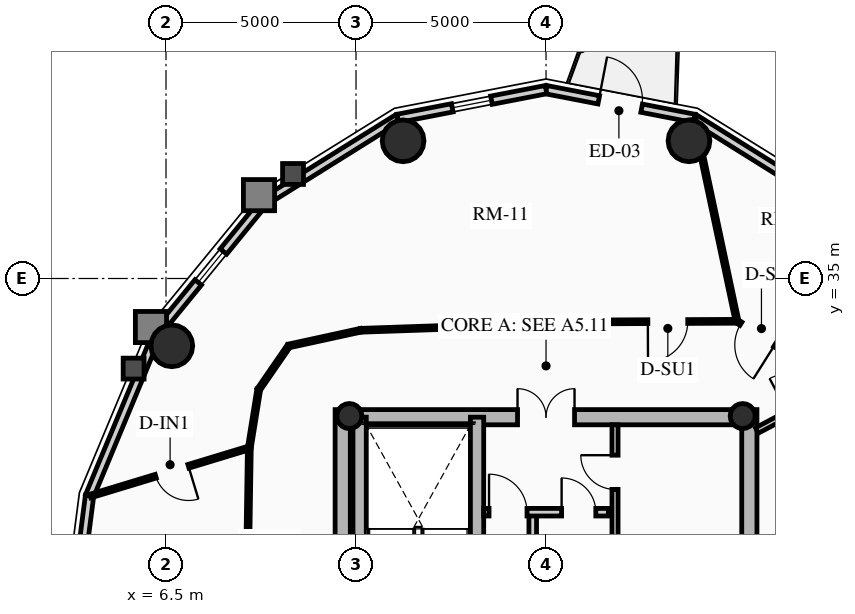
"""IFC4 building model, lengths in metres.
Left out: names, types, materials, properties, quantities, classifications, styles, units other than length and angle.
Written with IfcOpenShell. Run it as: python <this file> out.ifc"""

import sys

from ifc_helpers import new_model, si_unit, direction, frame, frame_2d, origin, origin_2d, place, context, subcontext, project, spatial, rectangle, circle, hollow_circle, extrude, source, transform, mapped, element, fill, save


model = new_model("IFC4")
c1 = context("Model", 3, precision=1e-05, world=origin(), true_north=direction((0.0, 1.0)))
c2 = subcontext(c1, "Body", "Model", "MODEL_VIEW")
j1 = project(units=[si_unit("LENGTHUNIT", "METRE"), si_unit("PLANEANGLEUNIT", "RADIAN")], contexts=[c1])
p1 = place(None, origin())
s1 = spatial("IfcSite", under=j1, at=p1, CompositionType="ELEMENT")
p2 = place(p1, origin())
s2 = spatial("IfcBuilding", under=s1, at=p2, CompositionType="ELEMENT")
p3 = place(p2, frame((0.0, 0.0, 232.45)))
s3 = spatial("IfcBuildingStorey", under=s2, at=p3, CompositionType="ELEMENT", Elevation=232.45)
for number, where, z_axis, x_axis in (
    (1, (11.15, 17.45, 0.0), (0.0, 0.0, 1.0), (0.0, 1.0, 0.0)),
    (2, (21.85, 17.45, 0.0), (0.0, 0.0, 1.0), (0.0, 1.0, 0.0)),
):
    element("IfcWall", number, at=place(p3, frame(where, z_axis=z_axis, x_axis=x_axis)), inside=s3, PredefinedType="SHEAR", context=c2, shape_type="SweptSolid", body=[
        extrude(rectangle(XDim=14.1, YDim=0.4, at=frame_2d((7.05, 0.0))), origin(), (0.0, 0.0, 1.0), 3.2),
    ])
p4 = place(p3, frame((11.15, 31.35, 0.0), z_axis=(0.0, 0.0, 1.0), x_axis=(1.0, 0.0, 0.0)))
e3 = element("IfcWall", 3, at=p4, inside=s3, PredefinedType="SHEAR", context=c2, shape_type="SweptSolid", body=[
    extrude(rectangle(XDim=10.7, YDim=0.4, at=frame_2d((5.35, 0.0))), origin(), (0.0, 0.0, 1.0), 3.2),
])
m1 = source(origin(), c2, "Body", "SweptSolid", [
    extrude(rectangle(XDim=1.5, YDim=2.02, at=frame_2d((0.75, 1.01))), frame((0.0, 0.21, 0.0), z_axis=(0.0, -1.0, 0.0), x_axis=(1.0, 0.0, 0.0)), (0.0, 0.0, 1.0), 0.42),
])
p5 = place(p4, frame((4.6, 0.0, 0.0)))
e4 = element("IfcOpeningElement", 4, at=p5, cuts=e3, PredefinedType="OPENING", context=c2, shape_type="MappedRepresentation", body=[
    mapped(m1, transform((0.0, 0.0, 0.0), x_axis=(1.0, 0.0, 0.0), y_axis=(0.0, 1.0, 0.0), z_axis=(0.0, 0.0, 1.0), scale=1.0)),
])
p6 = place(p3, frame((14.685, 17.65, 0.0), z_axis=(0.0, 0.0, 1.0), x_axis=(0.0, 1.0, 0.0)))
e5 = element("IfcWall", 5, at=p6, inside=s3, PredefinedType="SHEAR", context=c2, shape_type="SweptSolid", body=[
    extrude(rectangle(XDim=13.7, YDim=0.35, at=frame_2d((6.85, 0.0))), origin(), (0.0, 0.0, 1.0), 3.2),
])
m2 = source(origin(), c2, "Body", "SweptSolid", [
    extrude(rectangle(XDim=1.1, YDim=2.015, at=frame_2d((0.55, 1.007))), frame((0.0, 0.185, 0.0), z_axis=(0.0, -1.0, 0.0), x_axis=(1.0, 0.0, 0.0)), (0.0, 0.0, 1.0), 0.37),
])
p7 = place(p6, frame((4.85, 0.0, 0.0)))
e6 = element("IfcOpeningElement", 6, at=p7, cuts=e5, PredefinedType="OPENING", context=c2, shape_type="MappedRepresentation", body=[
    mapped(m2, transform((0.0, 0.0, 0.0), x_axis=(1.0, 0.0, 0.0), y_axis=(0.0, 1.0, 0.0), z_axis=(0.0, 0.0, 1.0), scale=1.0)),
])
p8 = place(p6, frame((0.625, 0.0, 0.0)))
e7 = element("IfcOpeningElement", 7, at=p8, cuts=e5, PredefinedType="OPENING", context=c2, shape_type="MappedRepresentation", body=[
    mapped(m2, transform((0.0, 0.0, 0.0), x_axis=(1.0, 0.0, 0.0), y_axis=(0.0, 1.0, 0.0), z_axis=(0.0, 0.0, 1.0), scale=1.0)),
])
p9 = place(p6, frame((2.625, 0.0, 0.0)))
e8 = element("IfcOpeningElement", 8, at=p9, cuts=e5, PredefinedType="OPENING", context=c2, shape_type="MappedRepresentation", body=[
    mapped(m2, transform((0.0, 0.0, 0.0), x_axis=(1.0, 0.0, 0.0), y_axis=(0.0, 1.0, 0.0), z_axis=(0.0, 0.0, 1.0), scale=1.0)),
])
m3 = source(origin(), c2, "Body", "SweptSolid", [
    extrude(rectangle(XDim=1.15, YDim=2.02, at=frame_2d((0.575, 1.01))), frame((0.0, 0.185, 0.0), z_axis=(0.0, -1.0, 0.0), x_axis=(1.0, 0.0, 0.0)), (0.0, 0.0, 1.0), 0.37),
])
p10 = place(p6, frame((7.27, 0.0, 0.0)))
e9 = element("IfcOpeningElement", 9, at=p10, cuts=e5, PredefinedType="OPENING", context=c2, shape_type="MappedRepresentation", body=[
    mapped(m3, transform((0.0, 0.0, 0.0), x_axis=(1.0, 0.0, 0.0), y_axis=(0.0, 1.0, 0.0), z_axis=(0.0, 0.0, 1.0), scale=1.0)),
])
p11 = place(p3, frame((11.595, 24.655, 0.0), z_axis=(0.0, 0.0, 1.0), x_axis=(0.0, 1.0, 0.0)))
e10 = element("IfcWall", 10, at=p11, inside=s3, PredefinedType="SHEAR", context=c2, shape_type="SweptSolid", body=[
    extrude(rectangle(XDim=6.695, YDim=0.35, at=frame_2d((3.348, 0.0))), origin(), (0.0, 0.0, 1.0), 3.2),
])
for number, where, z_axis, x_axis in (
    (11, (11.325, 31.38, 0.0), (0.0, 0.0, 1.0), (1.0, 0.0, 0.0)),
    (12, (21.675, 31.38, 0.0), (0.0, 0.0, 1.0), (1.0, 0.0, 0.0)),
):
    element("IfcColumn", number, at=place(p3, frame(where, z_axis=z_axis, x_axis=x_axis)), inside=s3, PredefinedType="COLUMN", context=c2, shape_type="SweptSolid", body=[
        extrude(hollow_circle(Radius=0.33, WallThickness=0.025, at=origin_2d()), origin(), (0.0, 0.0, 1.0), 3.2),
    ])
for number, where, z_axis, x_axis in (
    (13, (20.261, 38.623, 0.0), (0.0, 0.0, 1.0), (1.0, 0.0, 0.0)),
    (14, (12.739, 38.623, 0.0), (0.0, 0.0, 1.0), (1.0, 0.0, 0.0)),
    (15, (6.653, 33.229, 0.0), (0.0, 0.0, 1.0), (1.0, 0.0, 0.0)),
):
    element("IfcColumn", number, at=place(p3, frame(where, z_axis=z_axis, x_axis=x_axis)), inside=s3, PredefinedType="USERDEFINED", context=c2, shape_type="SweptSolid", body=[
        extrude(circle(Radius=0.55, at=origin_2d()), origin(), (0.0, 0.0, 1.0), 3.2),
    ])
p12 = place(p3, frame((20.403, 39.213, 0.0), z_axis=(0.0, 0.0, 1.0), x_axis=(0.848318713376, -0.529485939886, 0.0)))
e16 = element("IfcWall", 16, at=p12, inside=s3, PredefinedType="SOLIDWALL", context=c2, shape_type="SweptSolid", body=[
    extrude(rectangle(XDim=4.15, YDim=0.22, at=frame_2d((2.075, 0.0))), origin(), (0.0, 0.0, 1.0), 2.402),
])
p13 = place(p3, frame((16.5, 39.97, 0.0), z_axis=(0.0, 0.0, 1.0), x_axis=(0.981700307484, -0.190432419211, 0.0)))
e17 = element("IfcWall", 17, at=p13, inside=s3, PredefinedType="SOLIDWALL", context=c2, shape_type="SweptSolid", body=[
    extrude(rectangle(XDim=3.976, YDim=0.22, at=frame_2d((1.988, 0.0))), origin(), (0.0, 0.0, 1.0), 2.402),
])
m4 = source(origin(), c2, "Body", "SweptSolid", [
    extrude(rectangle(XDim=1.15, YDim=2.005, at=frame_2d((0.575, 1.002))), frame((0.0, 0.12, 0.0), z_axis=(0.0, -1.0, 0.0), x_axis=(1.0, 0.0, 0.0)), (0.0, 0.0, 1.0), 0.24),
])
p14 = place(p13, frame((1.413, 0.0, 0.0)))
e18 = element("IfcOpeningElement", 18, at=p14, cuts=e17, PredefinedType="OPENING", context=c2, shape_type="MappedRepresentation", body=[
    mapped(m4, transform((0.0, 0.0, 0.0), x_axis=(1.0, 0.0, 0.0), y_axis=(0.0, 1.0, 0.0), z_axis=(0.0, 0.0, 1.0), scale=1.0)),
])
p15 = place(p3, frame((12.597, 39.213, 0.0), z_axis=(0.0, 0.0, 1.0), x_axis=(0.981700307484, 0.190432419211, 0.0)))
e19 = element("IfcWall", 19, at=p15, inside=s3, PredefinedType="SOLIDWALL", context=c2, shape_type="SweptSolid", body=[
    extrude(rectangle(XDim=3.976, YDim=0.22, at=frame_2d((1.988, 0.0))), origin(), (0.0, 0.0, 1.0), 2.402),
])
m5 = source(origin(), c2, "Body", "SweptSolid", [
    extrude(rectangle(XDim=1.05, YDim=1.3, at=frame_2d((0.525, 0.65))), frame((0.0, 0.12, 0.0), z_axis=(0.0, -1.0, 0.0), x_axis=(1.0, 0.0, 0.0)), (0.0, 0.0, 1.0), 0.24),
])
p16 = place(p15, frame((1.463, 0.0, 0.65)))
e20 = element("IfcOpeningElement", 20, at=p16, cuts=e19, PredefinedType="OPENING", context=c2, shape_type="MappedRepresentation", body=[
    mapped(m5, transform((0.0, 0.0, 0.0), x_axis=(1.0, 0.0, 0.0), y_axis=(0.0, 1.0, 0.0), z_axis=(0.0, 0.0, 1.0), scale=1.0)),
])
p17 = place(p3, frame((9.076, 37.015, 0.0), z_axis=(0.0, 0.0, 1.0), x_axis=(0.848318713376, 0.529485939886, 0.0)))
e21 = element("IfcWall", 21, at=p17, inside=s3, PredefinedType="SOLIDWALL", context=c2, shape_type="SweptSolid", body=[
    extrude(rectangle(XDim=4.15, YDim=0.22, at=frame_2d((2.075, 0.0))), origin(), (0.0, 0.0, 1.0), 2.402),
])
p18 = place(p3, frame((6.282, 33.593, 0.0), z_axis=(0.0, 0.0, 1.0), x_axis=(0.632467166636, 0.774587169483, 0.0)))
e22 = element("IfcWall", 22, at=p18, inside=s3, PredefinedType="SOLIDWALL", context=c2, shape_type="SweptSolid", body=[
    extrude(rectangle(XDim=4.418, YDim=0.22, at=frame_2d((2.209, 0.0))), origin(), (0.0, 0.0, 1.0), 2.402),
])
p19 = place(p18, frame((1.684, 0.0, 0.65)))
e23 = element("IfcOpeningElement", 23, at=p19, cuts=e22, PredefinedType="OPENING", context=c2, shape_type="MappedRepresentation", body=[
    mapped(m5, transform((0.0, 0.0, 0.0), x_axis=(1.0, 0.0, 0.0), y_axis=(0.0, 1.0, 0.0), z_axis=(0.0, 0.0, 1.0), scale=1.0)),
])
p20 = place(p3, frame((4.488, 29.281, 0.0), z_axis=(0.0, 0.0, 1.0), x_axis=(0.384036305194, 0.923317993052, 0.0)))
e24 = element("IfcWall", 24, at=p20, inside=s3, PredefinedType="SOLIDWALL", context=c2, shape_type="SweptSolid", body=[
    extrude(rectangle(XDim=4.671, YDim=0.22, at=frame_2d((2.335, 0.0))), origin(), (0.0, 0.0, 1.0), 2.402),
])
p21 = place(p3, frame((3.87, 24.5, 0.0), z_axis=(0.0, 0.0, 1.0), x_axis=(0.128241318541, 0.991742993027, 0.0)))
e25 = element("IfcWall", 25, at=p21, inside=s3, PredefinedType="SOLIDWALL", context=c2, shape_type="SweptSolid", body=[
    extrude(rectangle(XDim=4.82, YDim=0.22, at=frame_2d((2.41, 0.0))), origin(), (0.0, 0.0, 1.0), 2.402),
])
p22 = place(p21, frame((1.885, 0.0, 0.65)))
e26 = element("IfcOpeningElement", 26, at=p22, cuts=e25, PredefinedType="OPENING", context=c2, shape_type="MappedRepresentation", body=[
    mapped(m5, transform((0.0, 0.0, 0.0), x_axis=(1.0, 0.0, 0.0), y_axis=(0.0, 1.0, 0.0), z_axis=(0.0, 0.0, 1.0), scale=1.0)),
])
p23 = place(p3, frame((16.15, 26.45, 0.0), z_axis=(0.0, 0.0, 1.0), x_axis=(0.0, 1.0, 0.0)))
e27 = element("IfcWall", 27, at=p23, inside=s3, PredefinedType="PARTITIONING", context=c2, shape_type="SweptSolid", body=[
    extrude(rectangle(XDim=2.4, YDim=0.2, at=frame_2d((1.2, 0.0))), origin(), (0.0, 0.0, 1.0), 2.765),
])
p24 = place(p3, frame((14.86, 28.85, 0.0), z_axis=(0.0, 0.0, 1.0), x_axis=(1.0, 0.0, 0.0)))
e28 = element("IfcWall", 28, at=p24, inside=s3, PredefinedType="PARTITIONING", context=c2, shape_type="SweptSolid", body=[
    extrude(rectangle(XDim=3.28, YDim=0.2, at=frame_2d((1.64, 0.0))), origin(), (0.0, 0.0, 1.0), 2.765),
])
m6 = source(origin(), c2, "Body", "SweptSolid", [
    extrude(rectangle(XDim=1.0, YDim=2.015, at=frame_2d((0.5, 1.007))), frame((0.0, 0.11, 0.0), z_axis=(0.0, -1.0, 0.0), x_axis=(1.0, 0.0, 0.0)), (0.0, 0.0, 1.0), 0.22),
])
p25 = place(p24, frame((0.14, 0.0, 0.0)))
e29 = element("IfcOpeningElement", 29, at=p25, cuts=e28, PredefinedType="OPENING", context=c2, shape_type="MappedRepresentation", body=[
    mapped(m6, transform((0.0, 0.0, 0.0), x_axis=(1.0, 0.0, 0.0), y_axis=(0.0, 1.0, 0.0), z_axis=(0.0, 0.0, 1.0), scale=1.0)),
])
m7 = source(origin(), c2, "Body", "SweptSolid", [
    extrude(rectangle(XDim=0.9, YDim=2.005, at=frame_2d((0.45, 1.002))), frame((0.0, 0.11, 0.0), z_axis=(0.0, -1.0, 0.0), x_axis=(1.0, 0.0, 0.0)), (0.0, 0.0, 1.0), 0.22),
])
p26 = place(p24, frame((2.05, 0.0, 0.0)))
e30 = element("IfcOpeningElement", 30, at=p26, cuts=e28, PredefinedType="OPENING", context=c2, shape_type="MappedRepresentation", body=[
    mapped(m7, transform((0.0, 0.0, 0.0), x_axis=(1.0, 0.0, 0.0), y_axis=(0.0, 1.0, 0.0), z_axis=(0.0, 0.0, 1.0), scale=1.0)),
])
p27 = place(p3, frame((18.315, 27.25, 0.0), z_axis=(0.0, 0.0, 1.0), x_axis=(0.0, 1.0, 0.0)))
e31 = element("IfcWall", 31, at=p27, inside=s3, PredefinedType="PARTITIONING", context=c2, shape_type="SweptSolid", body=[
    extrude(rectangle(XDim=3.9, YDim=0.16, at=frame_2d((1.95, 0.0))), origin(), (0.0, 0.0, 1.0), 2.765),
])
m8 = source(origin(), c2, "Body", "SweptSolid", [
    extrude(rectangle(XDim=0.9, YDim=2.005, at=frame_2d((0.45, 1.002))), frame((0.0, 0.09, 0.0), z_axis=(0.0, -1.0, 0.0), x_axis=(1.0, 0.0, 0.0)), (0.0, 0.0, 1.0), 0.18),
])
p28 = place(p27, frame((2.2, 0.0, 0.0)))
e32 = element("IfcOpeningElement", 32, at=p28, cuts=e31, PredefinedType="OPENING", context=c2, shape_type="MappedRepresentation", body=[
    mapped(m8, transform((0.0, 0.0, 0.0), x_axis=(1.0, 0.0, 0.0), y_axis=(0.0, 1.0, 0.0), z_axis=(0.0, 0.0, 1.0), scale=1.0)),
])
p29 = place(p3, frame((22.877, 33.022, 0.0), z_axis=(0.0, 0.0, 1.0), x_axis=(-0.845895608855, 0.533348496689, 0.0)))
e33 = element("IfcWall", 33, at=p29, inside=s3, PredefinedType="MOVABLE", context=c2, shape_type="SweptSolid", body=[
    extrude(rectangle(XDim=1.597, YDim=0.1, at=frame_2d((0.798, 0.0))), origin(), (0.0, 0.0, 1.0), 2.335),
])
m9 = source(origin(), c2, "Body", "SweptSolid", [
    extrude(rectangle(XDim=1.05, YDim=2.015, at=frame_2d((0.525, 1.007))), frame((0.0, 0.06, 0.0), z_axis=(0.0, -1.0, 0.0), x_axis=(1.0, 0.0, 0.0)), (0.0, 0.0, 1.0), 0.12),
])
p30 = place(p29, frame((0.427, 0.0, 0.0)))
e34 = element("IfcOpeningElement", 34, at=p30, cuts=e33, PredefinedType="OPENING", context=c2, shape_type="MappedRepresentation", body=[
    mapped(m9, transform((0.0, 0.0, 0.0), x_axis=(1.0, 0.0, 0.0), y_axis=(0.0, 1.0, 0.0), z_axis=(0.0, 0.0, 1.0), scale=1.0)),
])
p31 = place(p3, frame((21.527, 33.873, 0.0), z_axis=(0.0, 0.0, 1.0), x_axis=(-0.999991838845, -0.004040079574, 0.0)))
e35 = element("IfcWall", 35, at=p31, inside=s3, PredefinedType="MOVABLE", context=c2, shape_type="SweptSolid", body=[
    extrude(rectangle(XDim=3.384, YDim=0.1, at=frame_2d((1.692, 0.0))), origin(), (0.0, 0.0, 1.0), 2.402),
])
p32 = place(p31, frame((1.298, 0.0, 0.0)))
e36 = element("IfcOpeningElement", 36, at=p32, cuts=e35, PredefinedType="OPENING", context=c2, shape_type="MappedRepresentation", body=[
    mapped(m9, transform((0.0, 0.0, 0.0), x_axis=(1.0, 0.0, 0.0), y_axis=(0.0, 1.0, 0.0), z_axis=(0.0, 0.0, 1.0), scale=1.0)),
])
p33 = place(p3, frame((18.143, 33.86, 0.0), z_axis=(0.0, 0.0, 1.0), x_axis=(-0.999419208319, -0.034077060363, 0.0)))
e37 = element("IfcWall", 37, at=p33, inside=s3, PredefinedType="MOVABLE", context=c2, shape_type="SweptSolid", body=[
    extrude(rectangle(XDim=6.527, YDim=0.1, at=frame_2d((3.263, 0.0))), origin(), (0.0, 0.0, 1.0), 2.335),
])
p34 = place(p3, frame((11.62, 33.637, 0.0), z_axis=(0.0, 0.0, 1.0), x_axis=(-0.97702579435, -0.213121085711, 0.0)))
e38 = element("IfcWall", 38, at=p34, inside=s3, PredefinedType="MOVABLE", context=c2, shape_type="SweptSolid", body=[
    extrude(rectangle(XDim=1.935, YDim=0.1, at=frame_2d((0.967, 0.0))), origin(), (0.0, 0.0, 1.0), 2.335),
])
p35 = place(p3, frame((9.729, 33.225, 0.0), z_axis=(0.0, 0.0, 1.0), x_axis=(-0.567183649484, -0.82359134755, 0.0)))
e39 = element("IfcWall", 39, at=p35, inside=s3, PredefinedType="MOVABLE", context=c2, shape_type="SweptSolid", body=[
    extrude(rectangle(XDim=1.392, YDim=0.1, at=frame_2d((0.696, 0.0))), origin(), (0.0, 0.0, 1.0), 2.402),
])
p36 = place(p3, frame((8.94, 32.078, 0.0), z_axis=(0.0, 0.0, 1.0), x_axis=(-0.159148467753, -0.98725466077, 0.0)))
e40 = element("IfcWall", 40, at=p36, inside=s3, PredefinedType="MOVABLE", context=c2, shape_type="SweptSolid", body=[
    extrude(rectangle(XDim=1.554, YDim=0.1, at=frame_2d((0.777, 0.0))), origin(), (0.0, 0.0, 1.0), 2.335),
])
p37 = place(p3, frame((8.693, 30.544, 0.0), z_axis=(0.0, 0.0, 1.0), x_axis=(-0.015307007986, -0.99988284089, 0.0)))
e41 = element("IfcWall", 41, at=p37, inside=s3, PredefinedType="MOVABLE", context=c2, shape_type="SweptSolid", body=[
    extrude(rectangle(XDim=6.045, YDim=0.1, at=frame_2d((3.022, 0.0))), origin(), (0.0, 0.0, 1.0), 2.335),
])
p38 = place(p3, frame((21.527, 33.873, 0.0), z_axis=(0.0, 0.0, 1.0), x_axis=(-0.207772326864, 0.97817721308, 0.0)))
e42 = element("IfcWall", 42, at=p38, inside=s3, PredefinedType="MOVABLE", context=c2, shape_type="SweptSolid", body=[
    extrude(rectangle(XDim=5.439, YDim=0.1, at=frame_2d((2.72, 0.0))), origin(), (0.0, 0.0, 1.0), 2.402),
])
p39 = place(p3, frame((22.05, 31.0, 0.0), z_axis=(0.0, 0.0, 1.0), x_axis=(0.882791584709, 0.469764853908, 0.0)))
e43 = element("IfcWall", 43, at=p39, inside=s3, PredefinedType="PARTITIONING", context=c2, shape_type="SweptSolid", body=[
    extrude(rectangle(XDim=2.186, YDim=0.16, at=frame_2d((1.093, 0.0))), origin(), (0.0, 0.0, 1.0), 2.335),
])
m10 = source(origin(), c2, "Body", "SweptSolid", [
    extrude(rectangle(XDim=1.05, YDim=2.015, at=frame_2d((0.525, 1.007))), frame((0.0, 0.09, 0.0), z_axis=(0.0, -1.0, 0.0), x_axis=(1.0, 0.0, 0.0)), (0.0, 0.0, 1.0), 0.18),
])
p40 = place(p39, frame((0.936, 0.0, 0.0)))
e44 = element("IfcOpeningElement", 44, at=p40, cuts=e43, PredefinedType="OPENING", context=c2, shape_type="MappedRepresentation", body=[
    mapped(m10, transform((0.0, 0.0, 0.0), x_axis=(1.0, 0.0, 0.0), y_axis=(0.0, 1.0, 0.0), z_axis=(0.0, 0.0, 1.0), scale=1.0)),
])
p41 = place(p3, frame((8.693, 30.544, 0.0), z_axis=(0.0, 0.0, 1.0), x_axis=(-0.956933754187, -0.290306372814, 0.0)))
e45 = element("IfcWall", 45, at=p41, inside=s3, PredefinedType="MOVABLE", context=c2, shape_type="SweptSolid", body=[
    extrude(rectangle(XDim=4.374, YDim=0.1, at=frame_2d((2.187, 0.0))), origin(), (0.0, 0.0, 1.0), 2.335),
])
m11 = source(origin(), c2, "Body", "SweptSolid", [
    extrude(rectangle(XDim=0.9, YDim=2.005, at=frame_2d((0.45, 1.002))), frame((0.0, 0.06, 0.0), z_axis=(0.0, -1.0, 0.0), x_axis=(1.0, 0.0, 0.0)), (0.0, 0.0, 1.0), 0.12),
])
p42 = place(p41, frame((1.674, 0.0, 0.0)))
e46 = element("IfcOpeningElement", 46, at=p42, cuts=e45, PredefinedType="OPENING", context=c2, shape_type="MappedRepresentation", body=[
    mapped(m11, transform((0.0, 0.0, 0.0), x_axis=(1.0, 0.0, 0.0), y_axis=(0.0, 1.0, 0.0), z_axis=(0.0, 0.0, 1.0), scale=1.0)),
])
m12 = source(origin(), c2, "Body", "SweptSolid", [
    extrude(rectangle(XDim=1.15, YDim=2.005, at=frame_2d((0.575, 1.002))), frame((0.0, 0.025, 0.0), z_axis=(0.0, -1.0, 0.0), x_axis=(1.0, 0.0, 0.0)), (0.0, 0.0, 1.0), 0.05),
])
p43 = place(p14, origin())
e47 = element("IfcDoor", 47, at=p43, inside=s3, OperationType="SINGLE_SWING_LEFT", PredefinedType="DOOR", context=c2, shape_type="MappedRepresentation", body=[
    mapped(m12, transform((0.0, 0.0, 0.0), x_axis=(1.0, 0.0, 0.0), y_axis=(0.0, 1.0, 0.0), z_axis=(0.0, 0.0, 1.0), scale=1.0)),
])
fill(e18, e47)
m13 = source(origin(), c2, "Body", "SweptSolid", [
    extrude(rectangle(XDim=1.05, YDim=1.3, at=frame_2d((0.525, 0.65))), frame((0.0, 0.03, 0.0), z_axis=(0.0, -1.0, 0.0), x_axis=(1.0, 0.0, 0.0)), (0.0, 0.0, 1.0), 0.06),
])
p44 = place(p16, origin())
e48 = element("IfcWindow", 48, at=p44, inside=s3, PartitioningType="SINGLE_PANEL", PredefinedType="WINDOW", context=c2, shape_type="MappedRepresentation", body=[
    mapped(m13, transform((0.0, 0.0, 0.0), x_axis=(1.0, 0.0, 0.0), y_axis=(0.0, 1.0, 0.0), z_axis=(0.0, 0.0, 1.0), scale=1.0)),
])
fill(e20, e48)
p45 = place(p19, origin())
e49 = element("IfcWindow", 49, at=p45, inside=s3, PartitioningType="SINGLE_PANEL", PredefinedType="WINDOW", context=c2, shape_type="MappedRepresentation", body=[
    mapped(m13, transform((0.0, 0.0, 0.0), x_axis=(1.0, 0.0, 0.0), y_axis=(0.0, 1.0, 0.0), z_axis=(0.0, 0.0, 1.0), scale=1.0)),
])
fill(e23, e49)
m14 = source(origin(), c2, "Body", "SweptSolid", [
    extrude(rectangle(XDim=1.5, YDim=2.02, at=frame_2d((0.75, 1.01))), frame((0.0, 0.025, 0.0), z_axis=(0.0, -1.0, 0.0), x_axis=(1.0, 0.0, 0.0)), (0.0, 0.0, 1.0), 0.05),
])
p46 = place(p5, origin())
e50 = element("IfcDoor", 50, at=p46, inside=s3, OperationType="DOUBLE_DOOR_SINGLE_SWING", PredefinedType="DOOR", context=c2, shape_type="MappedRepresentation", body=[
    mapped(m14, transform((0.0, 0.0, 0.0), x_axis=(1.0, 0.0, 0.0), y_axis=(0.0, 1.0, 0.0), z_axis=(0.0, 0.0, 1.0), scale=1.0)),
])
fill(e4, e50)
m15 = source(origin(), c2, "Body", "SweptSolid", [
    extrude(rectangle(XDim=1.0, YDim=2.015, at=frame_2d((0.5, 1.007))), frame((0.0, 0.025, 0.0), z_axis=(0.0, -1.0, 0.0), x_axis=(1.0, 0.0, 0.0)), (0.0, 0.0, 1.0), 0.05),
])
p47 = place(p25, origin())
e51 = element("IfcDoor", 51, at=p47, inside=s3, OperationType="SINGLE_SWING_LEFT", PredefinedType="DOOR", context=c2, shape_type="MappedRepresentation", body=[
    mapped(m15, transform((0.0, 0.0, 0.0), x_axis=(1.0, 0.0, 0.0), y_axis=(0.0, 1.0, 0.0), z_axis=(0.0, 0.0, 1.0), scale=1.0)),
])
fill(e29, e51)
m16 = source(origin(), c2, "Body", "SweptSolid", [
    extrude(rectangle(XDim=0.9, YDim=2.005, at=frame_2d((0.45, 1.002))), frame((0.0, 0.025, 0.0), z_axis=(0.0, -1.0, 0.0), x_axis=(1.0, 0.0, 0.0)), (0.0, 0.0, 1.0), 0.05),
])
p48 = place(p26, origin())
e52 = element("IfcDoor", 52, at=p48, inside=s3, OperationType="SINGLE_SWING_LEFT", PredefinedType="DOOR", context=c2, shape_type="MappedRepresentation", body=[
    mapped(m16, transform((0.0, 0.0, 0.0), x_axis=(1.0, 0.0, 0.0), y_axis=(0.0, 1.0, 0.0), z_axis=(0.0, 0.0, 1.0), scale=1.0)),
])
fill(e30, e52)
p49 = place(p28, origin())
e53 = element("IfcDoor", 53, at=p49, inside=s3, OperationType="SINGLE_SWING_RIGHT", PredefinedType="DOOR", context=c2, shape_type="MappedRepresentation", body=[
    mapped(m16, transform((0.0, 0.0, 0.0), x_axis=(1.0, 0.0, 0.0), y_axis=(0.0, 1.0, 0.0), z_axis=(0.0, 0.0, 1.0), scale=1.0)),
])
fill(e32, e53)
m17 = source(origin(), c2, "Body", "SweptSolid", [
    extrude(rectangle(XDim=1.05, YDim=2.015, at=frame_2d((0.525, 1.007))), frame((0.0, 0.025, 0.0), z_axis=(0.0, -1.0, 0.0), x_axis=(1.0, 0.0, 0.0)), (0.0, 0.0, 1.0), 0.05),
])
p50 = place(p30, origin())
e54 = element("IfcDoor", 54, at=p50, inside=s3, OperationType="SINGLE_SWING_LEFT", PredefinedType="DOOR", context=c2, shape_type="MappedRepresentation", body=[
    mapped(m17, transform((0.0, 0.0, 0.0), x_axis=(1.0, 0.0, 0.0), y_axis=(0.0, 1.0, 0.0), z_axis=(0.0, 0.0, 1.0), scale=1.0)),
])
fill(e34, e54)
p51 = place(p32, origin())
e55 = element("IfcDoor", 55, at=p51, inside=s3, OperationType="SINGLE_SWING_RIGHT", PredefinedType="DOOR", context=c2, shape_type="MappedRepresentation", body=[
    mapped(m17, transform((0.0, 0.0, 0.0), x_axis=(1.0, 0.0, 0.0), y_axis=(0.0, 1.0, 0.0), z_axis=(0.0, 0.0, 1.0), scale=1.0)),
])
fill(e36, e55)
p52 = place(p42, origin())
e56 = element("IfcDoor", 56, at=p52, inside=s3, OperationType="SINGLE_SWING_LEFT", PredefinedType="DOOR", context=c2, shape_type="MappedRepresentation", body=[
    mapped(m16, transform((0.0, 0.0, 0.0), x_axis=(1.0, 0.0, 0.0), y_axis=(0.0, 1.0, 0.0), z_axis=(0.0, 0.0, 1.0), scale=1.0)),
])
fill(e46, e56)
save(model, sys.argv[1])
